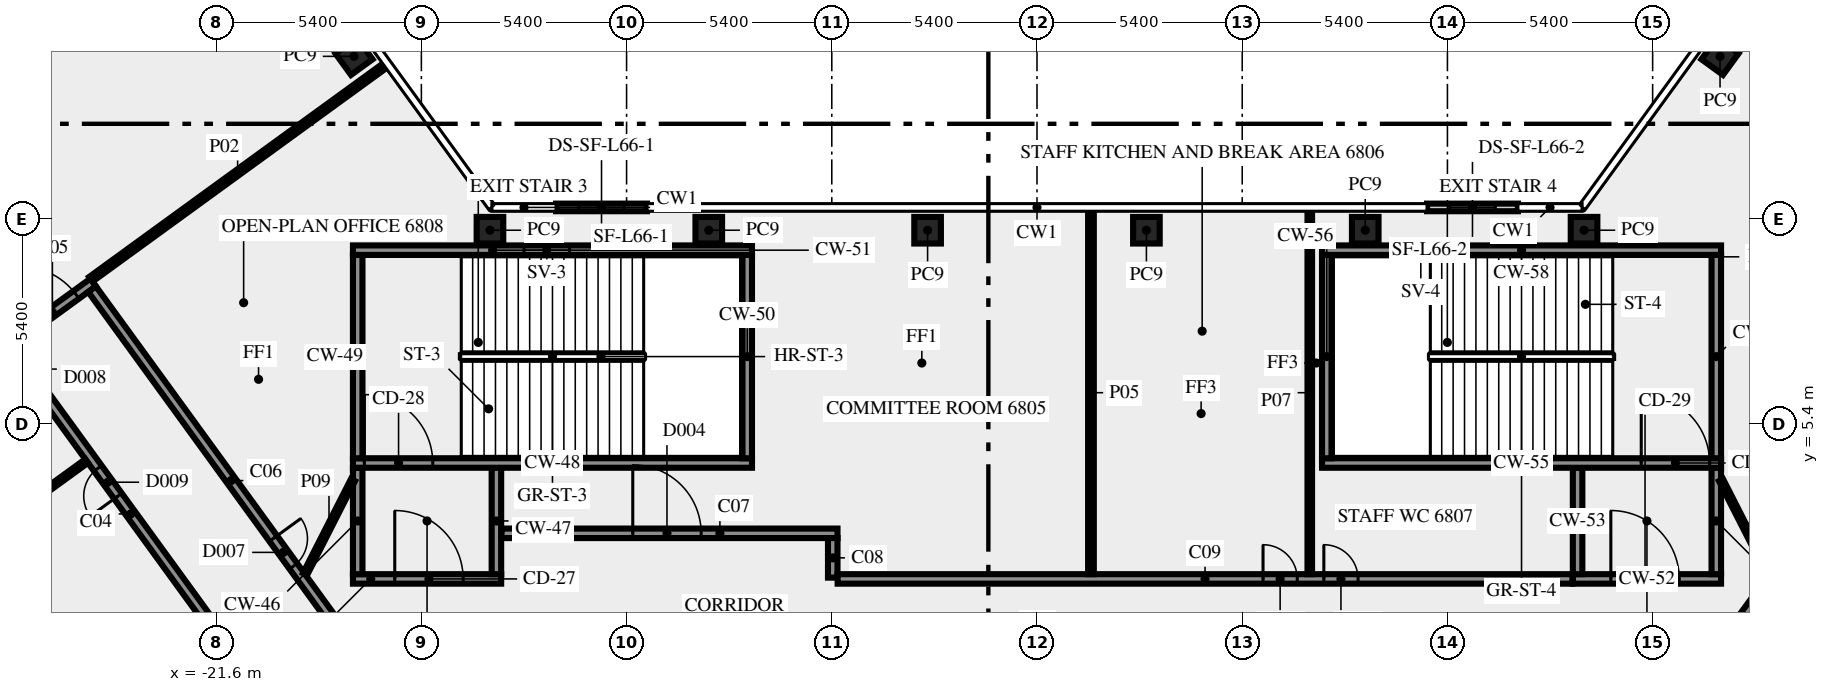
"""IFC4 building model, lengths in metres.
Left out: names, types, materials, properties, quantities, classifications, styles, units other than length and angle.
Written with IfcOpenShell. Run it as: python <this file> out.ifc"""

import sys

from ifc_helpers import new_model, si_unit, direction, frame, frame_2d, origin, origin_2d, place, context, subcontext, project, spatial, rectangle, extrude, element, fill, save


model = new_model("IFC4")
c1 = context("Model", 3, precision=1e-05, world=origin(), true_north=direction((0.0, 1.0)))
c2 = subcontext(c1, "Body", "Model", "MODEL_VIEW")
j1 = project(units=[si_unit("LENGTHUNIT", "METRE"), si_unit("PLANEANGLEUNIT", "RADIAN")], contexts=[c1])
p1 = place(None, origin())
s1 = spatial("IfcSite", under=j1, at=p1, CompositionType="ELEMENT")
p2 = place(p1, origin())
s2 = spatial("IfcBuilding", under=s1, at=p2, CompositionType="ELEMENT")
p3 = place(p2, frame((0.0, 0.0, 293.0)))
s3 = spatial("IfcBuildingStorey", under=s2, at=p3, CompositionType="ELEMENT", Elevation=293.0)
for number, where, z_axis, x_axis in (
    (1, (-17.974, 15.075, 0.0), (0.0, 0.0, 1.0), (-0.588, 0.809, 0.0)),
    (2, (17.974, 15.075, 0.0), (0.0, 0.0, 1.0), (-0.588, -0.809, 0.0)),
    (3, (14.395, 10.5, 0.0), (0.0, 0.0, 1.0), (-1.0, 0.0, 0.0)),
    (4, (8.637, 10.5, 0.0), (0.0, 0.0, 1.0), (-1.0, 0.0, 0.0)),
    (5, (2.879, 10.5, 0.0), (0.0, 0.0, 1.0), (-1.0, 0.0, 0.0)),
    (6, (-2.879, 10.5, 0.0), (0.0, 0.0, 1.0), (-1.0, 0.0, 0.0)),
    (7, (-8.637, 10.5, 0.0), (0.0, 0.0, 1.0), (-1.0, 0.0, 0.0)),
    (8, (-14.395, 10.5, 0.0), (0.0, 0.0, 1.0), (-1.0, 0.0, 0.0)),
):
    element("IfcColumn", number, at=place(p3, frame(where, z_axis=z_axis, x_axis=x_axis)), inside=s3, PredefinedType="COLUMN", context=c2, shape_type="SweptSolid", body=[
        extrude(rectangle(XDim=0.7, YDim=0.7, at=origin_2d()), origin(), (0.0, 0.0, 1.0), 3.65),
    ])
p4 = place(p3, frame((12.655, 11.1, 0.0), z_axis=(0.0, 0.0, 1.0), x_axis=(-1.0, 0.0, 0.0)))
e9 = element("IfcWall", 9, at=p4, inside=s3, PredefinedType="SOLIDWALL", context=c2, shape_type="SweptSolid", body=[
    extrude(rectangle(XDim=2.392, YDim=0.2, at=frame_2d((1.196, 0.0))), origin(), (0.0, 0.0, 1.0), 3.65),
])
p5 = place(p4, frame((0.596, 0.0, 1.0)))
e10 = element("IfcOpeningElement", 10, at=p5, cuts=e9, PredefinedType="OPENING", context=c2, shape_type="SweptSolid", body=[
    extrude(rectangle(XDim=1.2, YDim=1.2, at=frame_2d((0.6, 0.6))), frame((0.0, 0.11, 0.0), z_axis=(0.0, -1.0, 0.0), x_axis=(1.0, 0.0, 0.0)), (0.0, 0.0, 1.0), 0.22),
])
p6 = place(p3, frame((-10.263, 11.1, 0.0), z_axis=(0.0, 0.0, 1.0), x_axis=(-1.0, 0.0, 0.0)))
e11 = element("IfcWall", 11, at=p6, inside=s3, PredefinedType="SOLIDWALL", context=c2, shape_type="SweptSolid", body=[
    extrude(rectangle(XDim=2.392, YDim=0.2, at=frame_2d((1.196, 0.0))), origin(), (0.0, 0.0, 1.0), 3.65),
])
p7 = place(p6, frame((0.596, 0.0, 1.0)))
e12 = element("IfcOpeningElement", 12, at=p7, cuts=e11, PredefinedType="OPENING", context=c2, shape_type="SweptSolid", body=[
    extrude(rectangle(XDim=1.2, YDim=1.2, at=frame_2d((0.6, 0.6))), frame((0.0, 0.11, 0.0), z_axis=(0.0, -1.0, 0.0), x_axis=(1.0, 0.0, 0.0)), (0.0, 0.0, 1.0), 0.22),
])
p8 = place(p3, frame((-18.0, 1.325, 0.0), z_axis=(0.0, 0.0, 1.0), x_axis=(1.0, 0.0, 0.0)))
e13 = element("IfcWall", 13, at=p8, inside=s3, PredefinedType="SHEAR", context=c2, shape_type="SweptSolid", body=[
    extrude(rectangle(XDim=3.9, YDim=0.25, at=frame_2d((1.95, 0.0))), origin(), (0.0, 0.0, 1.0), 3.65),
])
p9 = place(p8, frame((1.1, 0.0, 0.0)))
e14 = element("IfcOpeningElement", 14, at=p9, cuts=e13, PredefinedType="OPENING", context=c2, shape_type="SweptSolid", body=[
    extrude(rectangle(XDim=1.8, YDim=2.1, at=frame_2d((0.9, 1.05))), frame((0.0, 0.135, 0.0), z_axis=(0.0, -1.0, 0.0), x_axis=(1.0, 0.0, 0.0)), (0.0, 0.0, 1.0), 0.27),
])
for number, where, z_axis, x_axis in (
    (15, (-17.875, 1.45, 0.0), (0.0, 0.0, 1.0), (0.0, 1.0, 0.0)),
    (16, (-14.225, 1.45, 0.0), (0.0, 0.0, 1.0), (0.0, 1.0, 0.0)),
):
    element("IfcWall", number, at=place(p3, frame(where, z_axis=z_axis, x_axis=x_axis)), inside=s3, PredefinedType="SHEAR", context=c2, shape_type="SweptSolid", body=[
        extrude(rectangle(XDim=2.8, YDim=0.25, at=frame_2d((1.4, 0.0))), origin(), (0.0, 0.0, 1.0), 3.65),
    ])
p10 = place(p3, frame((-18.0, 4.375, 0.0), z_axis=(0.0, 0.0, 1.0), x_axis=(1.0, 0.0, 0.0)))
e17 = element("IfcWall", 17, at=p10, inside=s3, PredefinedType="SHEAR", context=c2, shape_type="SweptSolid", body=[
    extrude(rectangle(XDim=10.5, YDim=0.25, at=frame_2d((5.25, 0.0))), origin(), (0.0, 0.0, 1.0), 3.65),
])
p11 = place(p10, frame((0.3, 0.0, 0.0)))
e18 = element("IfcOpeningElement", 18, at=p11, cuts=e17, PredefinedType="OPENING", context=c2, shape_type="SweptSolid", body=[
    extrude(rectangle(XDim=1.8, YDim=2.1, at=frame_2d((0.9, 1.05))), frame((0.0, 0.135, 0.0), z_axis=(0.0, -1.0, 0.0), x_axis=(1.0, 0.0, 0.0)), (0.0, 0.0, 1.0), 0.27),
])
for number, where, z_axis, x_axis in (
    (19, (-17.875, 4.5, 0.0), (0.0, 0.0, 1.0), (0.0, 1.0, 0.0)),
    (20, (-7.625, 4.5, 0.0), (0.0, 0.0, 1.0), (0.0, 1.0, 0.0)),
):
    element("IfcWall", number, at=place(p3, frame(where, z_axis=z_axis, x_axis=x_axis)), inside=s3, PredefinedType="SHEAR", context=c2, shape_type="SweptSolid", body=[
        extrude(rectangle(XDim=5.35, YDim=0.25, at=frame_2d((2.675, 0.0))), origin(), (0.0, 0.0, 1.0), 3.65),
    ])
p12 = place(p3, frame((-18.0, 9.975, 0.0), z_axis=(0.0, 0.0, 1.0), x_axis=(1.0, 0.0, 0.0)))
e21 = element("IfcWall", 21, at=p12, inside=s3, PredefinedType="SHEAR", context=c2, shape_type="SweptSolid", body=[
    extrude(rectangle(XDim=10.5, YDim=0.25, at=frame_2d((5.25, 0.0))), origin(), (0.0, 0.0, 1.0), 3.65),
])
p13 = place(p12, frame((4.5, 0.0, 1.0)))
e22 = element("IfcOpeningElement", 22, at=p13, cuts=e21, PredefinedType="OPENING", context=c2, shape_type="SweptSolid", body=[
    extrude(rectangle(XDim=1.2, YDim=1.2, at=frame_2d((0.6, 0.6))), frame((0.0, 0.135, 0.0), z_axis=(0.0, -1.0, 0.0), x_axis=(1.0, 0.0, 0.0)), (0.0, 0.0, 1.0), 0.27),
])
p14 = place(p3, frame((14.1, 1.325, 0.0), z_axis=(0.0, 0.0, 1.0), x_axis=(1.0, 0.0, 0.0)))
e23 = element("IfcWall", 23, at=p14, inside=s3, PredefinedType="SHEAR", context=c2, shape_type="SweptSolid", body=[
    extrude(rectangle(XDim=3.9, YDim=0.25, at=frame_2d((1.95, 0.0))), origin(), (0.0, 0.0, 1.0), 3.65),
])
p15 = place(p14, frame((1.0, 0.0, 0.0)))
e24 = element("IfcOpeningElement", 24, at=p15, cuts=e23, PredefinedType="OPENING", context=c2, shape_type="SweptSolid", body=[
    extrude(rectangle(XDim=1.8, YDim=2.1, at=frame_2d((0.9, 1.05))), frame((0.0, 0.135, 0.0), z_axis=(0.0, -1.0, 0.0), x_axis=(1.0, 0.0, 0.0)), (0.0, 0.0, 1.0), 0.27),
])
for number, where, z_axis, x_axis in (
    (25, (14.225, 1.45, 0.0), (0.0, 0.0, 1.0), (0.0, 1.0, 0.0)),
    (26, (17.875, 1.45, 0.0), (0.0, 0.0, 1.0), (0.0, 1.0, 0.0)),
):
    element("IfcWall", number, at=place(p3, frame(where, z_axis=z_axis, x_axis=x_axis)), inside=s3, PredefinedType="SHEAR", context=c2, shape_type="SweptSolid", body=[
        extrude(rectangle(XDim=2.8, YDim=0.25, at=frame_2d((1.4, 0.0))), origin(), (0.0, 0.0, 1.0), 3.65),
    ])
p16 = place(p3, frame((7.5, 4.375, 0.0), z_axis=(0.0, 0.0, 1.0), x_axis=(1.0, 0.0, 0.0)))
e27 = element("IfcWall", 27, at=p16, inside=s3, PredefinedType="SHEAR", context=c2, shape_type="SweptSolid", body=[
    extrude(rectangle(XDim=10.5, YDim=0.25, at=frame_2d((5.25, 0.0))), origin(), (0.0, 0.0, 1.0), 3.65),
])
p17 = place(p16, frame((8.4, 0.0, 0.0)))
e28 = element("IfcOpeningElement", 28, at=p17, cuts=e27, PredefinedType="OPENING", context=c2, shape_type="SweptSolid", body=[
    extrude(rectangle(XDim=1.8, YDim=2.1, at=frame_2d((0.9, 1.05))), frame((0.0, 0.135, 0.0), z_axis=(0.0, -1.0, 0.0), x_axis=(1.0, 0.0, 0.0)), (0.0, 0.0, 1.0), 0.27),
])
for number, where, z_axis, x_axis in (
    (29, (7.625, 4.5, 0.0), (0.0, 0.0, 1.0), (0.0, 1.0, 0.0)),
    (30, (17.875, 4.5, 0.0), (0.0, 0.0, 1.0), (0.0, 1.0, 0.0)),
):
    element("IfcWall", number, at=place(p3, frame(where, z_axis=z_axis, x_axis=x_axis)), inside=s3, PredefinedType="SHEAR", context=c2, shape_type="SweptSolid", body=[
        extrude(rectangle(XDim=5.35, YDim=0.25, at=frame_2d((2.675, 0.0))), origin(), (0.0, 0.0, 1.0), 3.65),
    ])
p18 = place(p3, frame((7.5, 9.975, 0.0), z_axis=(0.0, 0.0, 1.0), x_axis=(1.0, 0.0, 0.0)))
e31 = element("IfcWall", 31, at=p18, inside=s3, PredefinedType="SHEAR", context=c2, shape_type="SweptSolid", body=[
    extrude(rectangle(XDim=10.5, YDim=0.25, at=frame_2d((5.25, 0.0))), origin(), (0.0, 0.0, 1.0), 3.65),
])
p19 = place(p18, frame((2.0, 0.0, 1.0)))
e32 = element("IfcOpeningElement", 32, at=p19, cuts=e31, PredefinedType="OPENING", context=c2, shape_type="SweptSolid", body=[
    extrude(rectangle(XDim=1.2, YDim=1.2, at=frame_2d((0.6, 0.6))), frame((0.0, 0.135, 0.0), z_axis=(0.0, -1.0, 0.0), x_axis=(1.0, 0.0, 0.0)), (0.0, 0.0, 1.0), 0.27),
])
p20 = place(p3, frame((17.545, -1.125, 0.0), z_axis=(0.0, 0.0, 1.0), x_axis=(0.58779555165, 0.809009511354, 0.0)))
e33 = element("IfcWall", 33, at=p20, inside=s3, PredefinedType="SOLIDWALL", context=c2, shape_type="SweptSolid", body=[
    extrude(rectangle(XDim=18.103, YDim=0.25, at=frame_2d((9.052, 0.0))), origin(), (0.0, 0.0, 1.0), 3.65),
])
p21 = place(p20, frame((3.441, 0.0, 0.0)))
e34 = element("IfcOpeningElement", 34, at=p21, cuts=e33, PredefinedType="OPENING", context=c2, shape_type="SweptSolid", body=[
    extrude(rectangle(XDim=0.9, YDim=2.1, at=frame_2d((0.45, 1.05))), frame((0.0, 0.135, 0.0), z_axis=(0.0, -1.0, 0.0), x_axis=(1.0, 0.0, 0.0)), (0.0, 0.0, 1.0), 0.27),
])
p22 = place(p3, frame((-20.531, -1.523, 0.0), z_axis=(0.0, 0.0, 1.0), x_axis=(-0.587782646447, 0.809018887626, 0.0)))
e35 = element("IfcWall", 35, at=p22, inside=s3, PredefinedType="SOLIDWALL", context=c2, shape_type="SweptSolid", body=[
    extrude(rectangle(XDim=11.27, YDim=0.25, at=frame_2d((5.635, 0.0))), origin(), (0.0, 0.0, 1.0), 3.65),
])
p23 = place(p22, frame((6.216, 0.0, 0.0)))
e36 = element("IfcOpeningElement", 36, at=p23, cuts=e35, PredefinedType="OPENING", context=c2, shape_type="SweptSolid", body=[
    extrude(rectangle(XDim=0.9, YDim=2.1, at=frame_2d((0.45, 1.05))), frame((0.0, 0.135, 0.0), z_axis=(0.0, -1.0, 0.0), x_axis=(1.0, 0.0, 0.0)), (0.0, 0.0, 1.0), 0.27),
])
p24 = place(p22, frame((9.896, 0.0, 0.0)))
e37 = element("IfcOpeningElement", 37, at=p24, cuts=e35, PredefinedType="OPENING", context=c2, shape_type="SweptSolid", body=[
    extrude(rectangle(XDim=0.9, YDim=2.1, at=frame_2d((0.45, 1.05))), frame((0.0, 0.135, 0.0), z_axis=(0.0, -1.0, 0.0), x_axis=(1.0, 0.0, 0.0)), (0.0, 0.0, 1.0), 0.27),
])
p25 = place(p3, frame((-26.981, 7.567, 0.0), z_axis=(0.0, 0.0, 1.0), x_axis=(0.809038743598, 0.587755315891, 0.0)))
e38 = element("IfcWall", 38, at=p25, inside=s3, PredefinedType="SOLIDWALL", context=c2, shape_type="SweptSolid", body=[
    extrude(rectangle(XDim=2.65, YDim=0.25, at=frame_2d((1.325, 0.0))), origin(), (0.0, 0.0, 1.0), 3.65),
])
p26 = place(p25, frame((0.3, 0.0, 0.0)))
e39 = element("IfcOpeningElement", 39, at=p26, cuts=e38, PredefinedType="OPENING", context=c2, shape_type="SweptSolid", body=[
    extrude(rectangle(XDim=1.8, YDim=2.1, at=frame_2d((0.9, 1.05))), frame((0.0, 0.135, 0.0), z_axis=(0.0, -1.0, 0.0), x_axis=(1.0, 0.0, 0.0)), (0.0, 0.0, 1.0), 0.27),
])
p27 = place(p3, frame((-24.865, 8.95, 0.0), z_axis=(0.0, 0.0, 1.0), x_axis=(0.587791617212, -0.809012369952, 0.0)))
e40 = element("IfcWall", 40, at=p27, inside=s3, PredefinedType="SOLIDWALL", context=c2, shape_type="SweptSolid", body=[
    extrude(rectangle(XDim=12.453, YDim=0.25, at=frame_2d((6.227, 0.0))), origin(), (0.0, 0.0, 1.0), 3.65),
])
p28 = place(p27, frame((8.112, 0.0, 0.0)))
e41 = element("IfcOpeningElement", 41, at=p28, cuts=e40, PredefinedType="OPENING", context=c2, shape_type="SweptSolid", body=[
    extrude(rectangle(XDim=0.9, YDim=2.1, at=frame_2d((0.45, 1.05))), frame((0.0, 0.135, 0.0), z_axis=(0.0, -1.0, 0.0), x_axis=(1.0, 0.0, 0.0)), (0.0, 0.0, 1.0), 0.27),
])
p29 = place(p3, frame((-14.09, 2.525, 0.0), z_axis=(0.0, 0.0, 1.0), x_axis=(1.0, 0.0, 0.0)))
e42 = element("IfcWall", 42, at=p29, inside=s3, PredefinedType="SOLIDWALL", context=c2, shape_type="SweptSolid", body=[
    extrude(rectangle(XDim=8.84, YDim=0.25, at=frame_2d((4.42, 0.0))), origin(), (0.0, 0.0, 1.0), 3.65),
])
p30 = place(p29, frame((3.453, 0.0, 0.0)))
e43 = element("IfcOpeningElement", 43, at=p30, cuts=e42, PredefinedType="OPENING", context=c2, shape_type="SweptSolid", body=[
    extrude(rectangle(XDim=1.8, YDim=2.1, at=frame_2d((0.9, 1.05))), frame((0.0, 0.135, 0.0), z_axis=(0.0, -1.0, 0.0), x_axis=(1.0, 0.0, 0.0)), (0.0, 0.0, 1.0), 0.27),
])
p31 = place(p3, frame((-5.375, 2.4, 0.0), z_axis=(0.0, 0.0, 1.0), x_axis=(0.0, -1.0, 0.0)))
e44 = element("IfcWall", 44, at=p31, inside=s3, PredefinedType="SOLIDWALL", context=c2, shape_type="SweptSolid", body=[
    extrude(rectangle(XDim=1.041, YDim=0.25, at=frame_2d((0.521, 0.0))), origin(), (0.0, 0.0, 1.0), 3.65),
])
p32 = place(p3, frame((-5.246, 1.325, 0.0), z_axis=(0.0, 0.0, 1.0), x_axis=(1.0, 0.0, 0.0)))
e45 = element("IfcWall", 45, at=p32, inside=s3, PredefinedType="SOLIDWALL", context=c2, shape_type="SweptSolid", body=[
    extrude(rectangle(XDim=19.336, YDim=0.25, at=frame_2d((9.668, 0.0))), origin(), (0.0, 0.0, 1.0), 3.65),
])
p33 = place(p32, frame((11.194, 0.0, 0.0)))
e46 = element("IfcOpeningElement", 46, at=p33, cuts=e45, PredefinedType="OPENING", context=c2, shape_type="SweptSolid", body=[
    extrude(rectangle(XDim=0.9, YDim=2.1, at=frame_2d((0.45, 1.05))), frame((0.0, 0.135, 0.0), z_axis=(0.0, -1.0, 0.0), x_axis=(1.0, 0.0, 0.0)), (0.0, 0.0, 1.0), 0.27),
])
p34 = place(p32, frame((12.794, 0.0, 0.0)))
e47 = element("IfcOpeningElement", 47, at=p34, cuts=e45, PredefinedType="OPENING", context=c2, shape_type="SweptSolid", body=[
    extrude(rectangle(XDim=0.9, YDim=2.1, at=frame_2d((0.45, 1.05))), frame((0.0, 0.135, 0.0), z_axis=(0.0, -1.0, 0.0), x_axis=(1.0, 0.0, 0.0)), (0.0, 0.0, 1.0), 0.27),
])
p35 = place(p3, frame((-17.172, 14.823, 0.0), z_axis=(0.0, 0.0, 1.0), x_axis=(-0.809013490065, -0.587790075531, 0.0)))
e48 = element("IfcWall", 48, at=p35, inside=s3, PredefinedType="PARTITIONING", context=c2, shape_type="SweptSolid", body=[
    extrude(rectangle(XDim=9.549, YDim=0.15, at=frame_2d((4.775, 0.0))), origin(), (0.0, 0.0, 1.0), 2.95),
])
p36 = place(p3, frame((-25.008, 4.427, 0.0), z_axis=(0.0, 0.0, 1.0), x_axis=(-0.808994684961, -0.587815957341, 0.0)))
e49 = element("IfcWall", 49, at=p36, inside=s3, PredefinedType="PARTITIONING", context=c2, shape_type="SweptSolid", body=[
    extrude(rectangle(XDim=9.55, YDim=0.12, at=frame_2d((4.775, 0.0))), origin(), (0.0, 0.0, 1.0), 2.95),
])
p37 = place(p3, frame((1.42, 1.45, 0.0), z_axis=(0.0, 0.0, 1.0), x_axis=(0.0, 1.0, 0.0)))
e50 = element("IfcWall", 50, at=p37, inside=s3, PredefinedType="PARTITIONING", context=c2, shape_type="SweptSolid", body=[
    extrude(rectangle(XDim=9.55, YDim=0.15, at=frame_2d((4.775, 0.0))), origin(), (0.0, 0.0, 1.0), 2.95),
])
p38 = place(p3, frame((7.178, 1.45, 0.0), z_axis=(0.0, 0.0, 1.0), x_axis=(0.0, 1.0, 0.0)))
e51 = element("IfcWall", 51, at=p38, inside=s3, PredefinedType="PARTITIONING", context=c2, shape_type="SweptSolid", body=[
    extrude(rectangle(XDim=9.55, YDim=0.12, at=frame_2d((4.775, 0.0))), origin(), (0.0, 0.0, 1.0), 2.95),
])
for number, where, z_axis, x_axis in (
    (52, (18.0, 3.925, 0.0), (0.0, 0.0, 1.0), (0.454, -0.891, 0.0)),
    (53, (-19.261, 1.45, 0.0), (0.0, 0.0, 1.0), (0.454, 0.891, 0.0)),
):
    element("IfcWall", number, at=place(p3, frame(where, z_axis=z_axis, x_axis=x_axis)), inside=s3, PredefinedType="PARTITIONING", context=c2, shape_type="SweptSolid", body=[
        extrude(rectangle(XDim=2.778, YDim=0.12, at=frame_2d((1.389, 0.0))), origin(), (0.0, 0.0, 1.0), 3.65),
    ])
p39 = place(p5, origin())
e54 = element("IfcWindow", 54, at=p39, inside=s3, PartitioningType="SINGLE_PANEL", PredefinedType="WINDOW", context=c2, shape_type="SweptSolid", body=[
    extrude(rectangle(XDim=1.2, YDim=1.2, at=frame_2d((0.6, 0.6))), frame((0.0, 0.03, 0.0), z_axis=(0.0, -1.0, 0.0), x_axis=(1.0, 0.0, 0.0)), (0.0, 0.0, 1.0), 0.06),
])
fill(e10, e54)
p40 = place(p7, origin())
e55 = element("IfcWindow", 55, at=p40, inside=s3, PartitioningType="SINGLE_PANEL", PredefinedType="WINDOW", context=c2, shape_type="SweptSolid", body=[
    extrude(rectangle(XDim=1.2, YDim=1.2, at=frame_2d((0.6, 0.6))), frame((0.0, 0.03, 0.0), z_axis=(0.0, -1.0, 0.0), x_axis=(1.0, 0.0, 0.0)), (0.0, 0.0, 1.0), 0.06),
])
fill(e12, e55)
p41 = place(p9, origin())
e56 = element("IfcDoor", 56, at=p41, inside=s3, OperationType="DOUBLE_DOOR_SINGLE_SWING", PredefinedType="DOOR", context=c2, shape_type="SweptSolid", body=[
    extrude(rectangle(XDim=1.8, YDim=2.1, at=frame_2d((0.9, 1.05))), frame((0.0, 0.025, 0.0), z_axis=(0.0, -1.0, 0.0), x_axis=(1.0, 0.0, 0.0)), (0.0, 0.0, 1.0), 0.05),
])
fill(e14, e56)
p42 = place(p11, origin())
e57 = element("IfcDoor", 57, at=p42, inside=s3, OperationType="DOUBLE_DOOR_SINGLE_SWING", PredefinedType="DOOR", context=c2, shape_type="SweptSolid", body=[
    extrude(rectangle(XDim=1.8, YDim=2.1, at=frame_2d((0.9, 1.05))), frame((0.0, 0.025, 0.0), z_axis=(0.0, -1.0, 0.0), x_axis=(1.0, 0.0, 0.0)), (0.0, 0.0, 1.0), 0.05),
])
fill(e18, e57)
p43 = place(p13, origin())
e58 = element("IfcWindow", 58, at=p43, inside=s3, PartitioningType="SINGLE_PANEL", PredefinedType="WINDOW", context=c2, shape_type="SweptSolid", body=[
    extrude(rectangle(XDim=1.2, YDim=1.2, at=frame_2d((0.6, 0.6))), frame((0.0, 0.03, 0.0), z_axis=(0.0, -1.0, 0.0), x_axis=(1.0, 0.0, 0.0)), (0.0, 0.0, 1.0), 0.06),
])
fill(e22, e58)
p44 = place(p15, origin())
e59 = element("IfcDoor", 59, at=p44, inside=s3, OperationType="DOUBLE_DOOR_SINGLE_SWING", PredefinedType="DOOR", context=c2, shape_type="SweptSolid", body=[
    extrude(rectangle(XDim=1.8, YDim=2.1, at=frame_2d((0.9, 1.05))), frame((0.0, 0.025, 0.0), z_axis=(0.0, -1.0, 0.0), x_axis=(1.0, 0.0, 0.0)), (0.0, 0.0, 1.0), 0.05),
])
fill(e24, e59)
p45 = place(p17, origin())
e60 = element("IfcDoor", 60, at=p45, inside=s3, OperationType="DOUBLE_DOOR_SINGLE_SWING", PredefinedType="DOOR", context=c2, shape_type="SweptSolid", body=[
    extrude(rectangle(XDim=1.8, YDim=2.1, at=frame_2d((0.9, 1.05))), frame((0.0, 0.025, 0.0), z_axis=(0.0, -1.0, 0.0), x_axis=(1.0, 0.0, 0.0)), (0.0, 0.0, 1.0), 0.05),
])
fill(e28, e60)
p46 = place(p19, origin())
e61 = element("IfcWindow", 61, at=p46, inside=s3, PartitioningType="SINGLE_PANEL", PredefinedType="WINDOW", context=c2, shape_type="SweptSolid", body=[
    extrude(rectangle(XDim=1.2, YDim=1.2, at=frame_2d((0.6, 0.6))), frame((0.0, 0.03, 0.0), z_axis=(0.0, -1.0, 0.0), x_axis=(1.0, 0.0, 0.0)), (0.0, 0.0, 1.0), 0.06),
])
fill(e32, e61)
p47 = place(p28, origin())
e62 = element("IfcDoor", 62, at=p47, inside=s3, OperationType="SINGLE_SWING_RIGHT", PredefinedType="DOOR", context=c2, shape_type="SweptSolid", body=[
    extrude(rectangle(XDim=0.9, YDim=2.1, at=frame_2d((0.45, 1.05))), frame((0.0, 0.025, 0.0), z_axis=(0.0, -1.0, 0.0), x_axis=(1.0, 0.0, 0.0)), (0.0, 0.0, 1.0), 0.05),
])
fill(e41, e62)
p48 = place(p23, origin())
e63 = element("IfcDoor", 63, at=p48, inside=s3, OperationType="SINGLE_SWING_RIGHT", PredefinedType="DOOR", context=c2, shape_type="SweptSolid", body=[
    extrude(rectangle(XDim=0.9, YDim=2.1, at=frame_2d((0.45, 1.05))), frame((0.0, 0.025, 0.0), z_axis=(0.0, -1.0, 0.0), x_axis=(1.0, 0.0, 0.0)), (0.0, 0.0, 1.0), 0.05),
])
fill(e36, e63)
p49 = place(p30, origin())
e64 = element("IfcDoor", 64, at=p49, inside=s3, OperationType="DOUBLE_DOOR_SINGLE_SWING", PredefinedType="DOOR", context=c2, shape_type="SweptSolid", body=[
    extrude(rectangle(XDim=1.8, YDim=2.1, at=frame_2d((0.9, 1.05))), frame((0.0, 0.025, 0.0), z_axis=(0.0, -1.0, 0.0), x_axis=(1.0, 0.0, 0.0)), (0.0, 0.0, 1.0), 0.05),
])
fill(e43, e64)
p50 = place(p26, origin())
e65 = element("IfcDoor", 65, at=p50, inside=s3, OperationType="DOUBLE_DOOR_SINGLE_SWING", PredefinedType="DOOR", context=c2, shape_type="SweptSolid", body=[
    extrude(rectangle(XDim=1.8, YDim=2.1, at=frame_2d((0.9, 1.05))), frame((0.0, 0.025, 0.0), z_axis=(0.0, -1.0, 0.0), x_axis=(1.0, 0.0, 0.0)), (0.0, 0.0, 1.0), 0.05),
])
fill(e39, e65)
p51 = place(p33, origin())
e66 = element("IfcDoor", 66, at=p51, inside=s3, OperationType="SINGLE_SWING_RIGHT", PredefinedType="DOOR", context=c2, shape_type="SweptSolid", body=[
    extrude(rectangle(XDim=0.9, YDim=2.1, at=frame_2d((0.45, 1.05))), frame((0.0, 0.025, 0.0), z_axis=(0.0, -1.0, 0.0), x_axis=(1.0, 0.0, 0.0)), (0.0, 0.0, 1.0), 0.05),
])
fill(e46, e66)
p52 = place(p34, origin())
e67 = element("IfcDoor", 67, at=p52, inside=s3, OperationType="SINGLE_SWING_LEFT", PredefinedType="DOOR", context=c2, shape_type="SweptSolid", body=[
    extrude(rectangle(XDim=0.9, YDim=2.1, at=frame_2d((0.45, 1.05))), frame((0.0, 0.025, 0.0), z_axis=(0.0, -1.0, 0.0), x_axis=(1.0, 0.0, 0.0)), (0.0, 0.0, 1.0), 0.05),
])
fill(e47, e67)
save(model, sys.argv[1])
